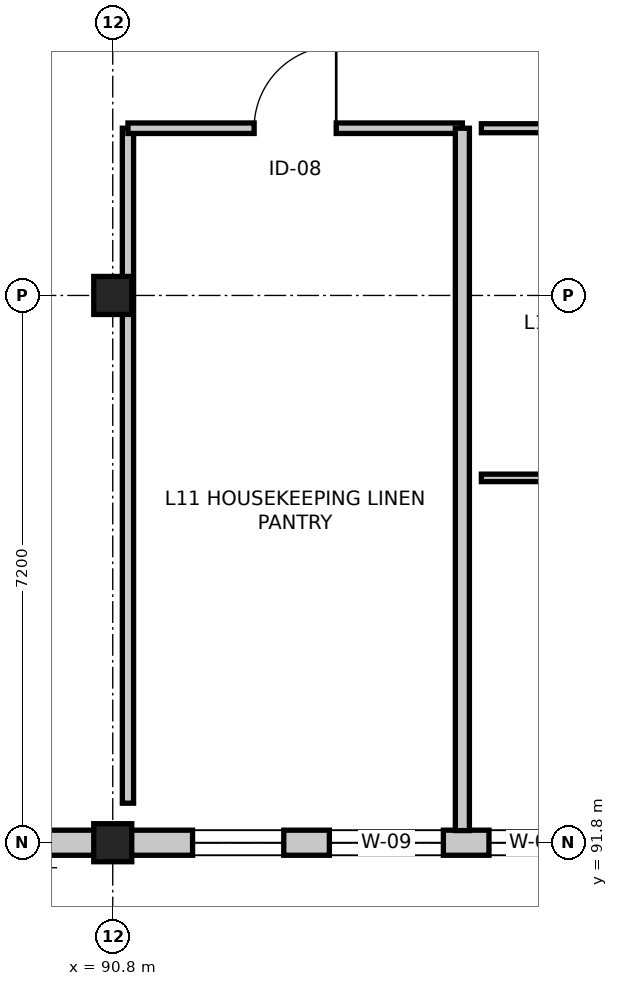
"""IFC4 building model, lengths in metres.
Left out: names, types, materials, properties, quantities, classifications, styles, units other than length and angle.
Written with IfcOpenShell. Run it as: python <this file> out.ifc"""

import sys

from ifc_helpers import new_model, si_unit, direction, frame, frame_2d, origin, origin_2d, place, context, subcontext, project, spatial, rectangle, extrude, element, fill, save


model = new_model("IFC4")
c1 = context("Model", 3, precision=1e-05, world=origin(), true_north=direction((0.0, 1.0)))
c2 = subcontext(c1, "Body", "Model", "MODEL_VIEW")
j1 = project(units=[si_unit("LENGTHUNIT", "METRE"), si_unit("PLANEANGLEUNIT", "RADIAN")], contexts=[c1])
p1 = place(None, origin())
s1 = spatial("IfcSite", under=j1, at=p1, CompositionType="ELEMENT")
p2 = place(p1, origin())
s2 = spatial("IfcBuilding", under=s1, at=p2, CompositionType="ELEMENT")
p3 = place(p2, frame((0.0, 0.0, 44.4)))
s3 = spatial("IfcBuildingStorey", under=s2, at=p3, CompositionType="ELEMENT", Elevation=44.4)
for number, where, z_axis, x_axis in (
    (1, (90.8, 91.8, 0.0), (0.0, 0.0, 1.0), (1.0, 0.0, 0.0)),
    (2, (90.8, 99.0, 0.0), (0.0, 0.0, 1.0), (1.0, 0.0, 0.0)),
):
    element("IfcColumn", number, at=place(p3, frame(where, z_axis=z_axis, x_axis=x_axis)), inside=s3, PredefinedType="COLUMN", context=c2, shape_type="SweptSolid", body=[
        extrude(rectangle(XDim=0.5, YDim=0.5, at=origin_2d()), origin(), (0.0, 0.0, 1.0), 4.2),
    ])
p4 = place(p3, frame((98.0, 91.8, 0.0), z_axis=(0.0, 0.0, 1.0), x_axis=(-1.0, 0.0, 0.0)))
e3 = element("IfcWall", 3, at=p4, inside=s3, PredefinedType="STANDARD", context=c2, shape_type="SweptSolid", body=[
    extrude(rectangle(XDim=7.2, YDim=0.33, at=frame_2d((3.6, 0.0))), origin(), (0.0, 0.0, 1.0), 3.335),
])
p5 = place(p4, frame((2.85, 0.0, 0.9)))
e4 = element("IfcOpeningElement", 4, at=p5, cuts=e3, PredefinedType="OPENING", context=c2, shape_type="SweptSolid", body=[
    extrude(rectangle(XDim=1.5, YDim=2.1, at=frame_2d((0.75, 1.05))), frame((0.0, 0.175, 0.0), z_axis=(0.0, -1.0, 0.0), x_axis=(1.0, 0.0, 0.0)), (0.0, 0.0, 1.0), 0.35),
])
p6 = place(p4, frame((1.05, 0.0, 0.85)))
e5 = element("IfcOpeningElement", 5, at=p6, cuts=e3, PredefinedType="OPENING", context=c2, shape_type="SweptSolid", body=[
    extrude(rectangle(XDim=1.2, YDim=1.8, at=frame_2d((0.6, 0.9))), frame((0.0, 0.175, 0.0), z_axis=(0.0, -1.0, 0.0), x_axis=(1.0, 0.0, 0.0)), (0.0, 0.0, 1.0), 0.35),
])
p7 = place(p4, frame((4.95, 0.0, 0.85)))
e6 = element("IfcOpeningElement", 6, at=p7, cuts=e3, PredefinedType="OPENING", context=c2, shape_type="SweptSolid", body=[
    extrude(rectangle(XDim=1.2, YDim=1.8, at=frame_2d((0.6, 0.9))), frame((0.0, 0.175, 0.0), z_axis=(0.0, -1.0, 0.0), x_axis=(1.0, 0.0, 0.0)), (0.0, 0.0, 1.0), 0.35),
])
p8 = place(p3, frame((90.8, 91.8, 0.0), z_axis=(0.0, 0.0, 1.0), x_axis=(-1.0, 0.0, 0.0)))
e7 = element("IfcWall", 7, at=p8, inside=s3, PredefinedType="STANDARD", context=c2, shape_type="SweptSolid", body=[
    extrude(rectangle(XDim=7.2, YDim=0.33, at=frame_2d((3.6, 0.0))), origin(), (0.0, 0.0, 1.0), 3.335),
])
p9 = place(p8, frame((2.7, 0.0, 0.9)))
e8 = element("IfcOpeningElement", 8, at=p9, cuts=e7, PredefinedType="OPENING", context=c2, shape_type="SweptSolid", body=[
    extrude(rectangle(XDim=1.8, YDim=2.1, at=frame_2d((0.9, 1.05))), frame((0.0, 0.175, 0.0), z_axis=(0.0, -1.0, 0.0), x_axis=(1.0, 0.0, 0.0)), (0.0, 0.0, 1.0), 0.35),
])
p10 = place(p8, frame((4.95, 0.0, 0.85)))
e9 = element("IfcOpeningElement", 9, at=p10, cuts=e7, PredefinedType="OPENING", context=c2, shape_type="SweptSolid", body=[
    extrude(rectangle(XDim=1.2, YDim=1.8, at=frame_2d((0.6, 0.9))), frame((0.0, 0.175, 0.0), z_axis=(0.0, -1.0, 0.0), x_axis=(1.0, 0.0, 0.0)), (0.0, 0.0, 1.0), 0.35),
])
p11 = place(p3, frame((91.0, 92.32, 0.0), z_axis=(0.0, 0.0, 1.0), x_axis=(0.0, 1.0, 0.0)))
e10 = element("IfcWall", 10, at=p11, inside=s3, PredefinedType="PARTITIONING", context=c2, shape_type="SweptSolid", body=[
    extrude(rectangle(XDim=8.88, YDim=0.148, at=frame_2d((4.44, 0.0))), origin(), (0.0, 0.0, 1.0), 3.285),
])
p12 = place(p3, frame((91.0, 101.2, 0.0), z_axis=(0.0, 0.0, 1.0), x_axis=(1.0, 0.0, 0.0)))
e11 = element("IfcWall", 11, at=p12, inside=s3, PredefinedType="PARTITIONING", context=c2, shape_type="SweptSolid", body=[
    extrude(rectangle(XDim=4.4, YDim=0.138, at=frame_2d((2.2, 0.0))), origin(), (0.0, 0.0, 1.0), 3.285),
])
p13 = place(p12, frame((1.66, 0.0, 0.0)))
e12 = element("IfcOpeningElement", 12, at=p13, cuts=e11, PredefinedType="OPENING", context=c2, shape_type="SweptSolid", body=[
    extrude(rectangle(XDim=1.08, YDim=2.15, at=frame_2d((0.54, 1.075))), frame((0.0, 0.079, 0.0), z_axis=(0.0, -1.0, 0.0), x_axis=(1.0, 0.0, 0.0)), (0.0, 0.0, 1.0), 0.158),
])
p14 = place(p3, frame((95.4, 101.2, 0.0), z_axis=(0.0, 0.0, 1.0), x_axis=(0.0, -1.0, 0.0)))
e13 = element("IfcWall", 13, at=p14, inside=s3, PredefinedType="PARTITIONING", context=c2, shape_type="SweptSolid", body=[
    extrude(rectangle(XDim=9.24, YDim=0.185, at=frame_2d((4.62, 0.0))), origin(), (0.0, 0.0, 1.0), 3.335),
])
p15 = place(p3, frame((95.65, 101.2, 0.0), z_axis=(0.0, 0.0, 1.0), x_axis=(1.0, 0.0, 0.0)))
e14 = element("IfcWall", 14, at=p15, inside=s3, PredefinedType="PARTITIONING", context=c2, shape_type="SweptSolid", body=[
    extrude(rectangle(XDim=3.25, YDim=0.118, at=frame_2d((1.625, 0.0))), origin(), (0.0, 0.0, 1.0), 3.285),
])
p16 = place(p15, frame((1.05, 0.0, 0.0)))
e15 = element("IfcOpeningElement", 15, at=p16, cuts=e14, PredefinedType="OPENING", context=c2, shape_type="SweptSolid", body=[
    extrude(rectangle(XDim=1.15, YDim=2.15, at=frame_2d((0.575, 1.075))), frame((0.0, 0.069, 0.0), z_axis=(0.0, -1.0, 0.0), x_axis=(1.0, 0.0, 0.0)), (0.0, 0.0, 1.0), 0.138),
])
p17 = place(p3, frame((98.9, 96.6, 0.0), z_axis=(0.0, 0.0, 1.0), x_axis=(-1.0, 0.0, 0.0)))
e16 = element("IfcWall", 16, at=p17, inside=s3, PredefinedType="PARTITIONING", context=c2, shape_type="SweptSolid", body=[
    extrude(rectangle(XDim=3.25, YDim=0.098, at=frame_2d((1.625, 0.0))), origin(), (0.0, 0.0, 1.0), 3.285),
])
p18 = place(p5, origin())
e17 = element("IfcWindow", 17, at=p18, inside=s3, PartitioningType="SINGLE_PANEL", PredefinedType="WINDOW", context=c2, shape_type="SweptSolid", body=[
    extrude(rectangle(XDim=1.5, YDim=2.1, at=frame_2d((0.75, 1.05))), frame((0.0, 0.03, 0.0), z_axis=(0.0, -1.0, 0.0), x_axis=(1.0, 0.0, 0.0)), (0.0, 0.0, 1.0), 0.06),
])
fill(e4, e17)
p19 = place(p6, origin())
e18 = element("IfcWindow", 18, at=p19, inside=s3, PartitioningType="SINGLE_PANEL", PredefinedType="WINDOW", context=c2, shape_type="SweptSolid", body=[
    extrude(rectangle(XDim=1.2, YDim=1.8, at=frame_2d((0.6, 0.9))), frame((0.0, 0.03, 0.0), z_axis=(0.0, -1.0, 0.0), x_axis=(1.0, 0.0, 0.0)), (0.0, 0.0, 1.0), 0.06),
])
fill(e5, e18)
p20 = place(p7, origin())
e19 = element("IfcWindow", 19, at=p20, inside=s3, PartitioningType="SINGLE_PANEL", PredefinedType="WINDOW", context=c2, shape_type="SweptSolid", body=[
    extrude(rectangle(XDim=1.2, YDim=1.8, at=frame_2d((0.6, 0.9))), frame((0.0, 0.03, 0.0), z_axis=(0.0, -1.0, 0.0), x_axis=(1.0, 0.0, 0.0)), (0.0, 0.0, 1.0), 0.06),
])
fill(e6, e19)
p21 = place(p2, frame((0.0, 0.0, 48.6)))
p22 = place(p21, frame((0.0, 0.0, -0.25)))
p23 = place(p22, frame((94.4, 102.6, 0.0)))
p24 = place(p23, frame((0.0, 0.0, 0.2)))
e20 = element("IfcWindow", 20, at=p24, inside=s3, PartitioningType="SINGLE_PANEL", PredefinedType="SKYLIGHT", context=c2, shape_type="SweptSolid", body=[
    extrude(rectangle(XDim=3.6, YDim=2.8, at=origin_2d()), origin(), (0.0, 0.0, 1.0), 0.05),
])
p25 = place(p13, origin())
e21 = element("IfcDoor", 21, at=p25, inside=s3, OperationType="SINGLE_SWING_RIGHT", PredefinedType="DOOR", context=c2, shape_type="SweptSolid", body=[
    extrude(rectangle(XDim=1.08, YDim=2.15, at=frame_2d((0.54, 1.075))), frame((0.0, 0.025, 0.0), z_axis=(0.0, -1.0, 0.0), x_axis=(1.0, 0.0, 0.0)), (0.0, 0.0, 1.0), 0.05),
])
fill(e12, e21)
save(model, sys.argv[1])
